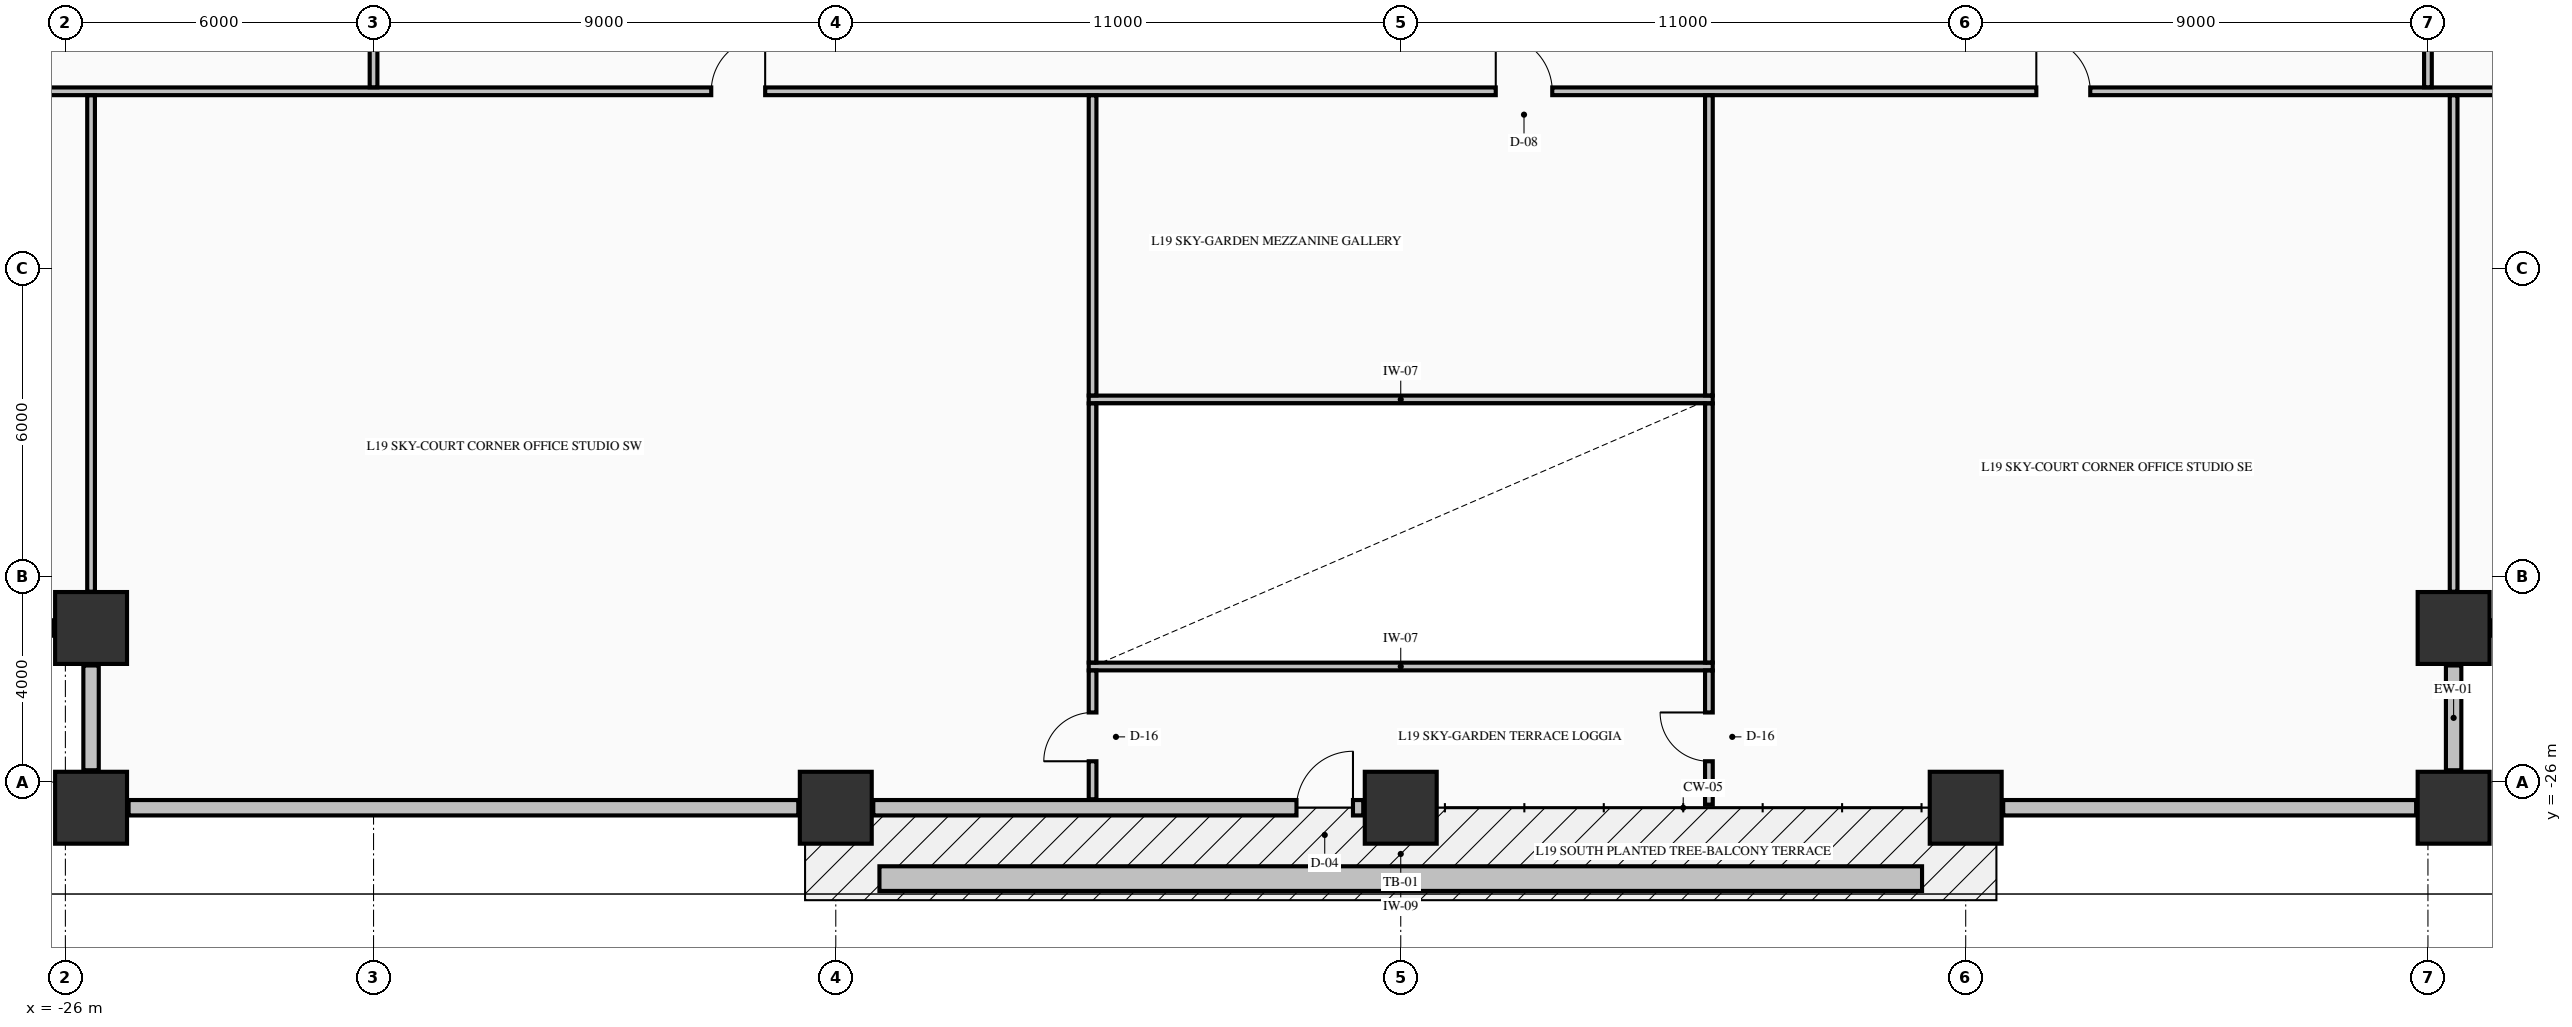
"""IFC4 building model, lengths in metres.
Left out: names, types, materials, properties, quantities, classifications, styles, units other than length and angle.
Written with IfcOpenShell. Run it as: python <this file> out.ifc"""

import sys

from ifc_helpers import new_model, si_unit, direction, frame, frame_2d, origin, origin_2d, place, context, subcontext, project, spatial, rectangle, extrude, element, fill, save


model = new_model("IFC4")
c1 = context("Model", 3, precision=1e-05, world=origin(), true_north=direction((0.0, 1.0)))
c2 = subcontext(c1, "Body", "Model", "MODEL_VIEW")
j1 = project(units=[si_unit("LENGTHUNIT", "METRE"), si_unit("PLANEANGLEUNIT", "RADIAN")], contexts=[c1])
p1 = place(None, origin())
s1 = spatial("IfcSite", under=j1, at=p1, CompositionType="ELEMENT")
p2 = place(p1, origin())
s2 = spatial("IfcBuilding", under=s1, at=p2, CompositionType="ELEMENT")
p3 = place(p2, frame((0.0, 0.0, 78.61)))
s3 = spatial("IfcBuildingStorey", under=s2, at=p3, CompositionType="ELEMENT", Elevation=78.61)
for number, where, z_axis, x_axis in (
    (1, (-25.5, -26.5, -0.25), (0.0, 0.0, 1.0), (1.0, 0.0, 0.0)),
    (2, (-11.0, -26.5, -0.25), (0.0, 0.0, 1.0), (1.0, 0.0, 0.0)),
    (3, (0.0, -26.5, -0.25), (0.0, 0.0, 1.0), (1.0, 0.0, 0.0)),
    (4, (11.0, -26.5, -0.25), (0.0, 0.0, 1.0), (1.0, 0.0, 0.0)),
    (5, (20.5, -26.5, -0.25), (0.0, 0.0, 1.0), (1.0, 0.0, 0.0)),
    (6, (-25.5, -23.0, -0.25), (0.0, 0.0, 1.0), (1.0, 0.0, 0.0)),
    (7, (20.5, -23.0, -0.25), (0.0, 0.0, 1.0), (1.0, 0.0, 0.0)),
):
    element("IfcColumn", number, at=place(p3, frame(where, z_axis=z_axis, x_axis=x_axis)), inside=s3, PredefinedType="COLUMN", context=c2, shape_type="SweptSolid", body=[
        extrude(rectangle(XDim=1.4, YDim=1.4, at=origin_2d()), origin(), (0.0, 0.0, 1.0), 3.395),
    ])
for number, where, z_axis, x_axis in (
    (8, (20.5, -25.77, 0.0), (0.0, 0.0, 1.0), (0.0, 1.0, 0.0)),
    (9, (21.23, -23.0, 0.0), (0.0, 0.0, 1.0), (1.0, 0.0, 0.0)),
    (10, (-28.27, -23.0, 0.0), (0.0, 0.0, 1.0), (1.0, 0.0, 0.0)),
    (11, (-25.5, -23.73, 0.0), (0.0, 0.0, 1.0), (0.0, -1.0, 0.0)),
):
    element("IfcWall", number, at=place(p3, frame(where, z_axis=z_axis, x_axis=x_axis)), inside=s3, PredefinedType="STANDARD", context=c2, shape_type="SweptSolid", body=[
        extrude(rectangle(XDim=2.04, YDim=0.3, at=frame_2d((1.02, 0.0))), origin(), (0.0, 0.0, 1.0), 2.537),
    ])
p4 = place(p3, frame((-24.77, -26.5, 0.0), z_axis=(0.0, 0.0, 1.0), x_axis=(1.0, 0.0, 0.0)))
e12 = element("IfcWall", 12, at=p4, inside=s3, PredefinedType="STANDARD", context=c2, shape_type="SweptSolid", body=[
    extrude(rectangle(XDim=13.04, YDim=0.3, at=frame_2d((6.52, 0.0))), origin(), (0.0, 0.0, 1.0), 2.537),
])
p5 = place(p3, frame((-10.27, -26.5, 0.0), z_axis=(0.0, 0.0, 1.0), x_axis=(1.0, 0.0, 0.0)))
e13 = element("IfcWall", 13, at=p5, inside=s3, PredefinedType="STANDARD", context=c2, shape_type="SweptSolid", body=[
    extrude(rectangle(XDim=9.54, YDim=0.3, at=frame_2d((4.77, 0.0))), origin(), (0.0, 0.0, 1.0), 2.537),
])
p6 = place(p5, frame((8.24, 0.0, 0.0)))
e14 = element("IfcOpeningElement", 14, at=p6, cuts=e13, PredefinedType="OPENING", context=c2, shape_type="SweptSolid", body=[
    extrude(rectangle(XDim=1.1, YDim=2.15, at=frame_2d((0.55, 1.075))), frame((0.0, 0.16, 0.0), z_axis=(0.0, -1.0, 0.0), x_axis=(1.0, 0.0, 0.0)), (0.0, 0.0, 1.0), 0.32),
])
p7 = place(p3, frame((11.73, -26.5, 0.0), z_axis=(0.0, 0.0, 1.0), x_axis=(1.0, 0.0, 0.0)))
e15 = element("IfcWall", 15, at=p7, inside=s3, PredefinedType="STANDARD", context=c2, shape_type="SweptSolid", body=[
    extrude(rectangle(XDim=8.04, YDim=0.3, at=frame_2d((4.02, 0.0))), origin(), (0.0, 0.0, 1.0), 2.537),
])
for number, where, z_axis, x_axis in (
    (16, (-6.075, -23.75, 0.0), (0.0, 0.0, 1.0), (1.0, 0.0, 0.0)),
    (17, (-6.075, -18.55, 0.0), (0.0, 0.0, 1.0), (1.0, 0.0, 0.0)),
):
    element("IfcWall", number, at=place(p3, frame(where, z_axis=z_axis, x_axis=x_axis)), inside=s3, PredefinedType="PARTITIONING", context=c2, shape_type="SweptSolid", body=[
        extrude(rectangle(XDim=12.15, YDim=0.15, at=frame_2d((6.075, 0.0))), origin(), (0.0, 0.0, 1.0), 3.145),
    ])
p8 = place(p3, frame((-28.835, -12.55, 0.0), z_axis=(0.0, 0.0, 1.0), x_axis=(1.0, 0.0, 0.0)))
e18 = element("IfcWall", 18, at=p8, inside=s3, PredefinedType="PARTITIONING", context=c2, shape_type="SweptSolid", body=[
    extrude(rectangle(XDim=52.67, YDim=0.15, at=frame_2d((26.335, 0.0))), origin(), (0.0, 0.0, 1.0), 3.145),
])
p9 = place(p8, frame((30.685, 0.0, 0.0)))
e19 = element("IfcOpeningElement", 19, at=p9, cuts=e18, PredefinedType="OPENING", context=c2, shape_type="SweptSolid", body=[
    extrude(rectangle(XDim=1.1, YDim=2.15, at=frame_2d((0.55, 1.075))), frame((0.0, 0.085, 0.0), z_axis=(0.0, -1.0, 0.0), x_axis=(1.0, 0.0, 0.0)), (0.0, 0.0, 1.0), 0.17),
])
p10 = place(p8, frame((15.41, 0.0, 0.0)))
e20 = element("IfcOpeningElement", 20, at=p10, cuts=e18, PredefinedType="OPENING", context=c2, shape_type="SweptSolid", body=[
    extrude(rectangle(XDim=1.05, YDim=2.15, at=frame_2d((0.525, 1.075))), frame((0.0, 0.085, 0.0), z_axis=(0.0, -1.0, 0.0), x_axis=(1.0, 0.0, 0.0)), (0.0, 0.0, 1.0), 0.17),
])
p11 = place(p8, frame((41.21, 0.0, 0.0)))
e21 = element("IfcOpeningElement", 21, at=p11, cuts=e18, PredefinedType="OPENING", context=c2, shape_type="SweptSolid", body=[
    extrude(rectangle(XDim=1.05, YDim=2.15, at=frame_2d((0.525, 1.075))), frame((0.0, 0.085, 0.0), z_axis=(0.0, -1.0, 0.0), x_axis=(1.0, 0.0, 0.0)), (0.0, 0.0, 1.0), 0.17),
])
p12 = place(p3, frame((-25.5, -22.294, 0.0), z_axis=(0.0, 0.0, 1.0), x_axis=(0.0, 1.0, 0.0)))
e22 = element("IfcWall", 22, at=p12, inside=s3, PredefinedType="PARTITIONING", context=c2, shape_type="SweptSolid", body=[
    extrude(rectangle(XDim=9.666, YDim=0.15, at=frame_2d((4.833, 0.0))), origin(), (0.0, 0.0, 1.0), 3.145),
])
p13 = place(p3, frame((-20.0, -12.472, 0.0), z_axis=(0.0, 0.0, 1.0), x_axis=(0.0, 1.0, 0.0)))
e23 = element("IfcWall", 23, at=p13, inside=s3, PredefinedType="PARTITIONING", context=c2, shape_type="SweptSolid", body=[
    extrude(rectangle(XDim=1.916, YDim=0.15, at=frame_2d((0.958, 0.0))), origin(), (0.0, 0.0, 1.0), 2.485),
])
p14 = place(p13, frame((0.747, 0.0, 0.0)))
e24 = element("IfcOpeningElement", 24, at=p14, cuts=e23, PredefinedType="OPENING", context=c2, shape_type="SweptSolid", body=[
    extrude(rectangle(XDim=0.95, YDim=2.15, at=frame_2d((0.475, 1.075))), frame((0.0, 0.085, 0.0), z_axis=(0.0, -1.0, 0.0), x_axis=(1.0, 0.0, 0.0)), (0.0, 0.0, 1.0), 0.17),
])
p15 = place(p3, frame((-6.0, -26.335, 0.0), z_axis=(0.0, 0.0, 1.0), x_axis=(0.0, 1.0, 0.0)))
e25 = element("IfcWall", 25, at=p15, inside=s3, PredefinedType="PARTITIONING", context=c2, shape_type="SweptSolid", body=[
    extrude(rectangle(XDim=2.507, YDim=0.15, at=frame_2d((1.253, 0.0))), origin(), (0.0, 0.0, 1.0), 3.145),
])
p16 = place(p15, frame((0.74, 0.0, 0.0)))
e26 = element("IfcOpeningElement", 26, at=p16, cuts=e25, PredefinedType="OPENING", context=c2, shape_type="SweptSolid", body=[
    extrude(rectangle(XDim=0.95, YDim=2.15, at=frame_2d((0.475, 1.075))), frame((0.0, 0.085, 0.0), z_axis=(0.0, -1.0, 0.0), x_axis=(1.0, 0.0, 0.0)), (0.0, 0.0, 1.0), 0.17),
])
p17 = place(p3, frame((-6.0, -23.672, 0.0), z_axis=(0.0, 0.0, 1.0), x_axis=(0.0, 1.0, 0.0)))
e27 = element("IfcWall", 27, at=p17, inside=s3, PredefinedType="PARTITIONING", context=c2, shape_type="SweptSolid", body=[
    extrude(rectangle(XDim=5.044, YDim=0.15, at=frame_2d((2.522, 0.0))), origin(), (0.0, 0.0, 1.0), 3.145),
])
p18 = place(p3, frame((-6.0, -18.472, 0.0), z_axis=(0.0, 0.0, 1.0), x_axis=(0.0, 1.0, 0.0)))
e28 = element("IfcWall", 28, at=p18, inside=s3, PredefinedType="PARTITIONING", context=c2, shape_type="SweptSolid", body=[
    extrude(rectangle(XDim=5.844, YDim=0.15, at=frame_2d((2.922, 0.0))), origin(), (0.0, 0.0, 1.0), 3.145),
])
p19 = place(p3, frame((6.0, -26.44, 0.0), z_axis=(0.0, 0.0, 1.0), x_axis=(0.0, 1.0, 0.0)))
e29 = element("IfcWall", 29, at=p19, inside=s3, PredefinedType="PARTITIONING", context=c2, shape_type="SweptSolid", body=[
    extrude(rectangle(XDim=2.612, YDim=0.15, at=frame_2d((1.306, 0.0))), origin(), (0.0, 0.0, 1.0), 3.145),
])
p20 = place(p19, frame((0.845, 0.0, 0.0)))
e30 = element("IfcOpeningElement", 30, at=p20, cuts=e29, PredefinedType="OPENING", context=c2, shape_type="SweptSolid", body=[
    extrude(rectangle(XDim=0.95, YDim=2.15, at=frame_2d((0.475, 1.075))), frame((0.0, 0.085, 0.0), z_axis=(0.0, -1.0, 0.0), x_axis=(1.0, 0.0, 0.0)), (0.0, 0.0, 1.0), 0.17),
])
p21 = place(p3, frame((6.0, -23.672, 0.0), z_axis=(0.0, 0.0, 1.0), x_axis=(0.0, 1.0, 0.0)))
e31 = element("IfcWall", 31, at=p21, inside=s3, PredefinedType="PARTITIONING", context=c2, shape_type="SweptSolid", body=[
    extrude(rectangle(XDim=5.044, YDim=0.15, at=frame_2d((2.522, 0.0))), origin(), (0.0, 0.0, 1.0), 3.145),
])
p22 = place(p3, frame((6.0, -18.472, 0.0), z_axis=(0.0, 0.0, 1.0), x_axis=(0.0, 1.0, 0.0)))
e32 = element("IfcWall", 32, at=p22, inside=s3, PredefinedType="PARTITIONING", context=c2, shape_type="SweptSolid", body=[
    extrude(rectangle(XDim=5.844, YDim=0.15, at=frame_2d((2.922, 0.0))), origin(), (0.0, 0.0, 1.0), 3.145),
])
p23 = place(p3, frame((20.0, -12.472, 0.0), z_axis=(0.0, 0.0, 1.0), x_axis=(0.0, 1.0, 0.0)))
e33 = element("IfcWall", 33, at=p23, inside=s3, PredefinedType="PARTITIONING", context=c2, shape_type="SweptSolid", body=[
    extrude(rectangle(XDim=1.916, YDim=0.15, at=frame_2d((0.958, 0.0))), origin(), (0.0, 0.0, 1.0), 3.145),
])
p24 = place(p23, frame((0.747, 0.0, 0.0)))
e34 = element("IfcOpeningElement", 34, at=p24, cuts=e33, PredefinedType="OPENING", context=c2, shape_type="SweptSolid", body=[
    extrude(rectangle(XDim=0.95, YDim=2.15, at=frame_2d((0.475, 1.075))), frame((0.0, 0.085, 0.0), z_axis=(0.0, -1.0, 0.0), x_axis=(1.0, 0.0, 0.0)), (0.0, 0.0, 1.0), 0.17),
])
p25 = place(p3, frame((20.5, -22.294, 0.0), z_axis=(0.0, 0.0, 1.0), x_axis=(0.0, 1.0, 0.0)))
e35 = element("IfcWall", 35, at=p25, inside=s3, PredefinedType="PARTITIONING", context=c2, shape_type="SweptSolid", body=[
    extrude(rectangle(XDim=9.666, YDim=0.15, at=frame_2d((4.833, 0.0))), origin(), (0.0, 0.0, 1.0), 3.145),
])
p26 = place(p3, frame((-10.15, -27.88, -0.04), z_axis=(0.0, 0.0, 1.0), x_axis=(1.0, 0.0, 0.0)))
e36 = element("IfcWall", 36, at=p26, inside=s3, PredefinedType="PARAPET", context=c2, shape_type="SweptSolid", body=[
    extrude(rectangle(XDim=20.3, YDim=0.48, at=frame_2d((10.15, 0.0))), origin(), (0.0, 0.0, 1.0), 0.52),
])
p27 = place(p6, origin())
e37 = element("IfcDoor", 37, at=p27, inside=s3, OperationType="SINGLE_SWING_RIGHT", PredefinedType="DOOR", context=c2, shape_type="SweptSolid", body=[
    extrude(rectangle(XDim=1.1, YDim=2.15, at=frame_2d((0.55, 1.075))), frame((0.0, 0.025, 0.0), z_axis=(0.0, -1.0, 0.0), x_axis=(1.0, 0.0, 0.0)), (0.0, 0.0, 1.0), 0.05),
])
fill(e14, e37)
p28 = place(p16, origin())
e38 = element("IfcDoor", 38, at=p28, inside=s3, OperationType="SINGLE_SWING_LEFT", PredefinedType="DOOR", context=c2, shape_type="SweptSolid", body=[
    extrude(rectangle(XDim=0.95, YDim=2.15, at=frame_2d((0.475, 1.075))), frame((0.0, 0.025, 0.0), z_axis=(0.0, -1.0, 0.0), x_axis=(1.0, 0.0, 0.0)), (0.0, 0.0, 1.0), 0.05),
])
fill(e26, e38)
p29 = place(p20, origin())
e39 = element("IfcDoor", 39, at=p29, inside=s3, OperationType="SINGLE_SWING_RIGHT", PredefinedType="DOOR", context=c2, shape_type="SweptSolid", body=[
    extrude(rectangle(XDim=0.95, YDim=2.15, at=frame_2d((0.475, 1.075))), frame((0.0, 0.025, 0.0), z_axis=(0.0, -1.0, 0.0), x_axis=(1.0, 0.0, 0.0)), (0.0, 0.0, 1.0), 0.05),
])
fill(e30, e39)
p30 = place(p9, origin())
e40 = element("IfcDoor", 40, at=p30, inside=s3, OperationType="SINGLE_SWING_LEFT", PredefinedType="DOOR", context=c2, shape_type="SweptSolid", body=[
    extrude(rectangle(XDim=1.1, YDim=2.15, at=frame_2d((0.55, 1.075))), frame((0.0, 0.025, 0.0), z_axis=(0.0, -1.0, 0.0), x_axis=(1.0, 0.0, 0.0)), (0.0, 0.0, 1.0), 0.05),
])
fill(e19, e40)
p31 = place(p10, origin())
e41 = element("IfcDoor", 41, at=p31, inside=s3, OperationType="SINGLE_SWING_RIGHT", PredefinedType="DOOR", context=c2, shape_type="SweptSolid", body=[
    extrude(rectangle(XDim=1.05, YDim=2.15, at=frame_2d((0.525, 1.075))), frame((0.0, 0.025, 0.0), z_axis=(0.0, -1.0, 0.0), x_axis=(1.0, 0.0, 0.0)), (0.0, 0.0, 1.0), 0.05),
])
fill(e20, e41)
p32 = place(p11, origin())
e42 = element("IfcDoor", 42, at=p32, inside=s3, OperationType="SINGLE_SWING_LEFT", PredefinedType="DOOR", context=c2, shape_type="SweptSolid", body=[
    extrude(rectangle(XDim=1.05, YDim=2.15, at=frame_2d((0.525, 1.075))), frame((0.0, 0.025, 0.0), z_axis=(0.0, -1.0, 0.0), x_axis=(1.0, 0.0, 0.0)), (0.0, 0.0, 1.0), 0.05),
])
fill(e21, e42)
save(model, sys.argv[1])
